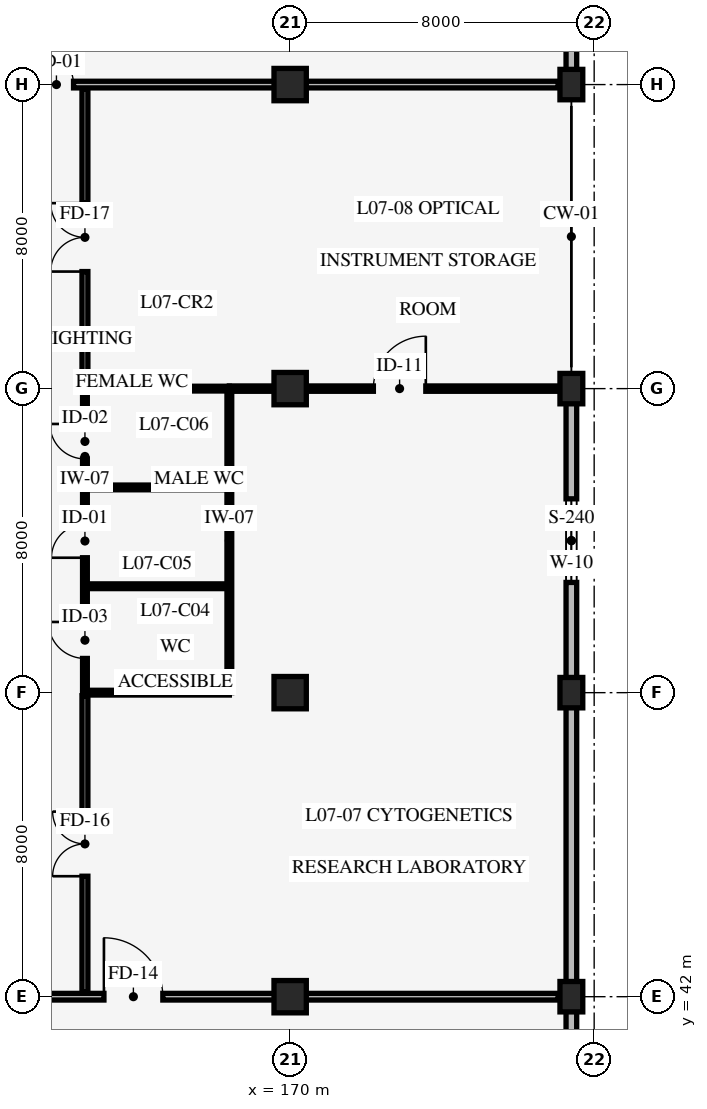
"""IFC4 building model, lengths in metres.
Left out: names, types, materials, properties, quantities, classifications, styles, units other than length and angle.
Written with IfcOpenShell. Run it as: python <this file> out.ifc"""

import sys

from ifc_helpers import new_model, si_unit, direction, frame, frame_2d, origin, origin_2d, place, context, subcontext, project, spatial, rectangle, extrude, element, fill, save


model = new_model("IFC4")
c1 = context("Model", 3, precision=1e-05, world=origin(), true_north=direction((0.0, 1.0)))
c2 = subcontext(c1, "Body", "Model", "MODEL_VIEW")
j1 = project(units=[si_unit("LENGTHUNIT", "METRE"), si_unit("PLANEANGLEUNIT", "RADIAN")], contexts=[c1])
p1 = place(None, origin())
s1 = spatial("IfcSite", under=j1, at=p1, CompositionType="ELEMENT")
p2 = place(p1, origin())
s2 = spatial("IfcBuilding", under=s1, at=p2, CompositionType="ELEMENT")
p3 = place(p2, frame((0.0, 0.0, 27.6)))
s3 = spatial("IfcBuildingStorey", under=s2, at=p3, CompositionType="ELEMENT", Elevation=27.6)
for number, where, z_axis, x_axis in (
    (1, (170.0, 42.0, 0.0), (0.0, 0.0, 1.0), (1.0, 0.0, 0.0)),
    (2, (170.0, 50.0, 0.0), (0.0, 0.0, 1.0), (1.0, 0.0, 0.0)),
    (3, (170.0, 58.0, 0.0), (0.0, 0.0, 1.0), (1.0, 0.0, 0.0)),
    (4, (170.0, 66.0, 0.0), (0.0, 0.0, 1.0), (1.0, 0.0, 0.0)),
):
    element("IfcColumn", number, at=place(p3, frame(where, z_axis=z_axis, x_axis=x_axis)), inside=s3, PredefinedType="COLUMN", context=c2, shape_type="SweptSolid", body=[
        extrude(rectangle(XDim=0.85, YDim=0.85, at=origin_2d()), origin(), (0.0, 0.0, 1.0), 4.2),
    ])
for number, where, z_axis, x_axis in (
    (5, (177.4, 42.0, 0.0), (0.0, 0.0, 1.0), (1.0, 0.0, 0.0)),
    (6, (177.4, 50.0, 0.0), (0.0, 0.0, 1.0), (1.0, 0.0, 0.0)),
    (7, (177.4, 58.0, 0.0), (0.0, 0.0, 1.0), (1.0, 0.0, 0.0)),
    (8, (177.4, 66.0, 0.0), (0.0, 0.0, 1.0), (1.0, 0.0, 0.0)),
):
    element("IfcColumn", number, at=place(p3, frame(where, z_axis=z_axis, x_axis=x_axis)), inside=s3, PredefinedType="COLUMN", context=c2, shape_type="SweptSolid", body=[
        extrude(rectangle(XDim=0.6, YDim=0.8, at=origin_2d()), origin(), (0.0, 0.0, 1.0), 4.2),
    ])
p4 = place(p3, frame((177.4, 74.0, 0.0), z_axis=(0.0, 0.0, 1.0), x_axis=(0.0, -1.0, 0.0)))
e9 = element("IfcWall", 9, at=p4, inside=s3, PredefinedType="STANDARD", context=c2, shape_type="SweptSolid", body=[
    extrude(rectangle(XDim=8.0, YDim=0.28, at=frame_2d((4.0, 0.0))), origin(), (0.0, 0.0, 1.0), 3.29),
])
p5 = place(p4, frame((2.7, 0.0, 0.85)))
e10 = element("IfcOpeningElement", 10, at=p5, cuts=e9, PredefinedType="OPENING", context=c2, shape_type="SweptSolid", body=[
    extrude(rectangle(XDim=2.6, YDim=1.5, at=frame_2d((1.3, 0.75))), frame((0.0, 0.15, 0.0), z_axis=(0.0, -1.0, 0.0), x_axis=(1.0, 0.0, 0.0)), (0.0, 0.0, 1.0), 0.3),
])
p6 = place(p3, frame((177.4, 58.0, 0.0), z_axis=(0.0, 0.0, 1.0), x_axis=(0.0, -1.0, 0.0)))
e11 = element("IfcWall", 11, at=p6, inside=s3, PredefinedType="STANDARD", context=c2, shape_type="SweptSolid", body=[
    extrude(rectangle(XDim=8.0, YDim=0.28, at=frame_2d((4.0, 0.0))), origin(), (0.0, 0.0, 1.0), 3.29),
])
p7 = place(p6, frame((2.9, 0.0, 0.85)))
e12 = element("IfcOpeningElement", 12, at=p7, cuts=e11, PredefinedType="OPENING", context=c2, shape_type="SweptSolid", body=[
    extrude(rectangle(XDim=2.2, YDim=1.4, at=frame_2d((1.1, 0.7))), frame((0.0, 0.15, 0.0), z_axis=(0.0, -1.0, 0.0), x_axis=(1.0, 0.0, 0.0)), (0.0, 0.0, 1.0), 0.3),
])
p8 = place(p3, frame((177.4, 50.0, 0.0), z_axis=(0.0, 0.0, 1.0), x_axis=(0.0, -1.0, 0.0)))
e13 = element("IfcWall", 13, at=p8, inside=s3, PredefinedType="STANDARD", context=c2, shape_type="SweptSolid", body=[
    extrude(rectangle(XDim=8.0, YDim=0.28, at=frame_2d((4.0, 0.0))), origin(), (0.0, 0.0, 1.0), 3.29),
])
p9 = place(p3, frame((177.4, 42.0, 0.0), z_axis=(0.0, 0.0, 1.0), x_axis=(0.0, -1.0, 0.0)))
e14 = element("IfcWall", 14, at=p9, inside=s3, PredefinedType="STANDARD", context=c2, shape_type="SweptSolid", body=[
    extrude(rectangle(XDim=8.0, YDim=0.28, at=frame_2d((4.0, 0.0))), origin(), (0.0, 0.0, 1.0), 3.29),
])
p10 = place(p9, frame((3.0, 0.0, 0.85)))
e15 = element("IfcOpeningElement", 15, at=p10, cuts=e14, PredefinedType="OPENING", context=c2, shape_type="SweptSolid", body=[
    extrude(rectangle(XDim=2.0, YDim=1.5, at=frame_2d((1.0, 0.75))), frame((0.0, 0.15, 0.0), z_axis=(0.0, -1.0, 0.0), x_axis=(1.0, 0.0, 0.0)), (0.0, 0.0, 1.0), 0.3),
])
p11 = place(p3, frame((164.6, 50.0, 0.0), z_axis=(0.0, 0.0, 1.0), x_axis=(0.0, 1.0, 0.0)))
e16 = element("IfcWall", 16, at=p11, inside=s3, PredefinedType="STANDARD", context=c2, shape_type="SweptSolid", body=[
    extrude(rectangle(XDim=8.0, YDim=0.125, at=frame_2d((4.0, 0.0))), origin(), (0.0, 0.0, 1.0), 3.9),
])
p12 = place(p11, frame((0.9, 0.0, 0.0)))
e17 = element("IfcOpeningElement", 17, at=p12, cuts=e16, PredefinedType="OPENING", context=c2, shape_type="SweptSolid", body=[
    extrude(rectangle(XDim=0.96, YDim=2.08, at=frame_2d((0.48, 1.04))), frame((0.0, 0.073, 0.0), z_axis=(0.0, -1.0, 0.0), x_axis=(1.0, 0.0, 0.0)), (0.0, 0.0, 1.0), 0.145),
])
p13 = place(p11, frame((3.55, 0.0, 0.0)))
e18 = element("IfcOpeningElement", 18, at=p13, cuts=e16, PredefinedType="OPENING", context=c2, shape_type="SweptSolid", body=[
    extrude(rectangle(XDim=0.88, YDim=2.05, at=frame_2d((0.44, 1.025))), frame((0.0, 0.073, 0.0), z_axis=(0.0, -1.0, 0.0), x_axis=(1.0, 0.0, 0.0)), (0.0, 0.0, 1.0), 0.145),
])
p14 = place(p11, frame((6.15, 0.0, 0.0)))
e19 = element("IfcOpeningElement", 19, at=p14, cuts=e16, PredefinedType="OPENING", context=c2, shape_type="SweptSolid", body=[
    extrude(rectangle(XDim=0.92, YDim=2.05, at=frame_2d((0.46, 1.025))), frame((0.0, 0.073, 0.0), z_axis=(0.0, -1.0, 0.0), x_axis=(1.0, 0.0, 0.0)), (0.0, 0.0, 1.0), 0.145),
])
p15 = place(p3, frame((168.4, 50.0, 0.0), z_axis=(0.0, 0.0, 1.0), x_axis=(0.0, 1.0, 0.0)))
e20 = element("IfcWall", 20, at=p15, inside=s3, PredefinedType="STANDARD", context=c2, shape_type="SweptSolid", body=[
    extrude(rectangle(XDim=8.0, YDim=0.125, at=frame_2d((4.0, 0.0))), origin(), (0.0, 0.0, 1.0), 3.9),
])
p16 = place(p3, frame((164.6, 50.0, 0.0), z_axis=(0.0, 0.0, 1.0), x_axis=(1.0, 0.0, 0.0)))
e21 = element("IfcWall", 21, at=p16, inside=s3, PredefinedType="STANDARD", context=c2, shape_type="SweptSolid", body=[
    extrude(rectangle(XDim=3.8, YDim=0.125, at=frame_2d((1.9, 0.0))), origin(), (0.0, 0.0, 1.0), 3.24),
])
for number, where, z_axis, x_axis in (
    (22, (164.6, 52.8, 0.0), (0.0, 0.0, 1.0), (1.0, 0.0, 0.0)),
    (23, (164.6, 55.4, 0.0), (0.0, 0.0, 1.0), (1.0, 0.0, 0.0)),
):
    element("IfcWall", number, at=place(p3, frame(where, z_axis=z_axis, x_axis=x_axis)), inside=s3, PredefinedType="STANDARD", context=c2, shape_type="SweptSolid", body=[
        extrude(rectangle(XDim=3.8, YDim=0.125, at=frame_2d((1.9, 0.0))), origin(), (0.0, 0.0, 1.0), 3.9),
    ])
p17 = place(p3, frame((164.6, 58.0, 0.0), z_axis=(0.0, 0.0, 1.0), x_axis=(1.0, 0.0, 0.0)))
e24 = element("IfcWall", 24, at=p17, inside=s3, PredefinedType="STANDARD", context=c2, shape_type="SweptSolid", body=[
    extrude(rectangle(XDim=3.8, YDim=0.125, at=frame_2d((1.9, 0.0))), origin(), (0.0, 0.0, 1.0), 3.24),
])
p18 = place(p3, frame((164.6, 42.12, 0.0), z_axis=(0.0, 0.0, 1.0), x_axis=(0.0, 1.0, 0.0)))
e25 = element("IfcWall", 25, at=p18, inside=s3, PredefinedType="STANDARD", context=c2, shape_type="SweptSolid", body=[
    extrude(rectangle(XDim=7.8, YDim=0.155, at=frame_2d((3.9, 0.0))), origin(), (0.0, 0.0, 1.0), 3.9),
])
p19 = place(p18, frame((3.05, 0.0, 0.0)))
e26 = element("IfcOpeningElement", 26, at=p19, cuts=e25, PredefinedType="OPENING", context=c2, shape_type="SweptSolid", body=[
    extrude(rectangle(XDim=1.7, YDim=2.3, at=frame_2d((0.85, 1.15))), frame((0.0, 0.087, 0.0), z_axis=(0.0, -1.0, 0.0), x_axis=(1.0, 0.0, 0.0)), (0.0, 0.0, 1.0), 0.175),
])
p20 = place(p3, frame((168.4, 58.0, 0.0), z_axis=(0.0, 0.0, 1.0), x_axis=(1.0, 0.0, 0.0)))
e27 = element("IfcWall", 27, at=p20, inside=s3, PredefinedType="STANDARD", context=c2, shape_type="SweptSolid", body=[
    extrude(rectangle(XDim=8.96, YDim=0.14, at=frame_2d((4.48, 0.0))), origin(), (0.0, 0.0, 1.0), 3.24),
])
p21 = place(p20, frame((3.79, 0.0, 0.0)))
e28 = element("IfcOpeningElement", 28, at=p21, cuts=e27, PredefinedType="OPENING", context=c2, shape_type="SweptSolid", body=[
    extrude(rectangle(XDim=1.38, YDim=2.16, at=frame_2d((0.69, 1.08))), frame((0.0, 0.08, 0.0), z_axis=(0.0, -1.0, 0.0), x_axis=(1.0, 0.0, 0.0)), (0.0, 0.0, 1.0), 0.16),
])
p22 = place(p3, frame((164.6, 58.08, 0.0), z_axis=(0.0, 0.0, 1.0), x_axis=(0.0, 1.0, 0.0)))
e29 = element("IfcWall", 29, at=p22, inside=s3, PredefinedType="STANDARD", context=c2, shape_type="SweptSolid", body=[
    extrude(rectangle(XDim=7.8, YDim=0.155, at=frame_2d((3.9, 0.0))), origin(), (0.0, 0.0, 1.0), 3.9),
])
p23 = place(p22, frame((3.0, 0.0, 0.0)))
e30 = element("IfcOpeningElement", 30, at=p23, cuts=e29, PredefinedType="OPENING", context=c2, shape_type="SweptSolid", body=[
    extrude(rectangle(XDim=1.8, YDim=2.3, at=frame_2d((0.9, 1.15))), frame((0.0, 0.087, 0.0), z_axis=(0.0, -1.0, 0.0), x_axis=(1.0, 0.0, 0.0)), (0.0, 0.0, 1.0), 0.175),
])
p24 = place(p3, frame((162.35, 42.0, 0.0), z_axis=(0.0, 0.0, 1.0), x_axis=(1.0, 0.0, 0.0)))
e31 = element("IfcWall", 31, at=p24, inside=s3, PredefinedType="STANDARD", context=c2, shape_type="SweptSolid", body=[
    extrude(rectangle(XDim=14.7, YDim=0.175, at=frame_2d((7.35, 0.0))), origin(), (0.0, 0.0, 1.0), 3.24),
])
p25 = place(p24, frame((2.75, 0.0, 0.0)))
e32 = element("IfcOpeningElement", 32, at=p25, cuts=e31, PredefinedType="OPENING", context=c2, shape_type="SweptSolid", body=[
    extrude(rectangle(XDim=1.55, YDim=2.25, at=frame_2d((0.775, 1.125))), frame((0.0, 0.098, 0.0), z_axis=(0.0, -1.0, 0.0), x_axis=(1.0, 0.0, 0.0)), (0.0, 0.0, 1.0), 0.195),
])
p26 = place(p3, frame((162.35, 66.0, 0.0), z_axis=(0.0, 0.0, 1.0), x_axis=(1.0, 0.0, 0.0)))
e33 = element("IfcWall", 33, at=p26, inside=s3, PredefinedType="STANDARD", context=c2, shape_type="SweptSolid", body=[
    extrude(rectangle(XDim=14.7, YDim=0.175, at=frame_2d((7.35, 0.0))), origin(), (0.0, 0.0, 1.0), 3.24),
])
p27 = place(p26, frame((1.05, 0.0, 0.0)))
e34 = element("IfcOpeningElement", 34, at=p27, cuts=e33, PredefinedType="OPENING", context=c2, shape_type="SweptSolid", body=[
    extrude(rectangle(XDim=0.9, YDim=2.1, at=frame_2d((0.45, 1.05))), frame((0.0, 0.098, 0.0), z_axis=(0.0, -1.0, 0.0), x_axis=(1.0, 0.0, 0.0)), (0.0, 0.0, 1.0), 0.195),
])
p28 = place(p7, origin())
e35 = element("IfcWindow", 35, at=p28, inside=s3, PartitioningType="SINGLE_PANEL", PredefinedType="WINDOW", context=c2, shape_type="SweptSolid", body=[
    extrude(rectangle(XDim=2.2, YDim=1.4, at=frame_2d((1.1, 0.7))), frame((0.0, 0.03, 0.0), z_axis=(0.0, -1.0, 0.0), x_axis=(1.0, 0.0, 0.0)), (0.0, 0.0, 1.0), 0.06),
])
fill(e12, e35)
p29 = place(p12, origin())
e36 = element("IfcDoor", 36, at=p29, inside=s3, OperationType="SINGLE_SWING_RIGHT", PredefinedType="DOOR", context=c2, shape_type="SweptSolid", body=[
    extrude(rectangle(XDim=0.96, YDim=2.08, at=frame_2d((0.48, 1.04))), frame((0.0, 0.025, 0.0), z_axis=(0.0, -1.0, 0.0), x_axis=(1.0, 0.0, 0.0)), (0.0, 0.0, 1.0), 0.05),
])
fill(e17, e36)
p30 = place(p13, origin())
e37 = element("IfcDoor", 37, at=p30, inside=s3, OperationType="SINGLE_SWING_LEFT", PredefinedType="DOOR", context=c2, shape_type="SweptSolid", body=[
    extrude(rectangle(XDim=0.88, YDim=2.05, at=frame_2d((0.44, 1.025))), frame((0.0, 0.025, 0.0), z_axis=(0.0, -1.0, 0.0), x_axis=(1.0, 0.0, 0.0)), (0.0, 0.0, 1.0), 0.05),
])
fill(e18, e37)
p31 = place(p14, origin())
e38 = element("IfcDoor", 38, at=p31, inside=s3, OperationType="SINGLE_SWING_RIGHT", PredefinedType="DOOR", context=c2, shape_type="SweptSolid", body=[
    extrude(rectangle(XDim=0.92, YDim=2.05, at=frame_2d((0.46, 1.025))), frame((0.0, 0.025, 0.0), z_axis=(0.0, -1.0, 0.0), x_axis=(1.0, 0.0, 0.0)), (0.0, 0.0, 1.0), 0.05),
])
fill(e19, e38)
p32 = place(p19, origin())
e39 = element("IfcDoor", 39, at=p32, inside=s3, OperationType="DOUBLE_DOOR_SINGLE_SWING", PredefinedType="DOOR", context=c2, shape_type="SweptSolid", body=[
    extrude(rectangle(XDim=1.7, YDim=2.3, at=frame_2d((0.85, 1.15))), frame((0.0, 0.025, 0.0), z_axis=(0.0, -1.0, 0.0), x_axis=(1.0, 0.0, 0.0)), (0.0, 0.0, 1.0), 0.05),
])
fill(e26, e39)
p33 = place(p21, origin())
e40 = element("IfcDoor", 40, at=p33, inside=s3, OperationType="SINGLE_SWING_RIGHT", PredefinedType="DOOR", context=c2, shape_type="SweptSolid", body=[
    extrude(rectangle(XDim=1.38, YDim=2.16, at=frame_2d((0.69, 1.08))), frame((0.0, 0.025, 0.0), z_axis=(0.0, -1.0, 0.0), x_axis=(1.0, 0.0, 0.0)), (0.0, 0.0, 1.0), 0.05),
])
fill(e28, e40)
p34 = place(p23, origin())
e41 = element("IfcDoor", 41, at=p34, inside=s3, OperationType="DOUBLE_DOOR_SINGLE_SWING", PredefinedType="DOOR", context=c2, shape_type="SweptSolid", body=[
    extrude(rectangle(XDim=1.8, YDim=2.3, at=frame_2d((0.9, 1.15))), frame((0.0, 0.025, 0.0), z_axis=(0.0, -1.0, 0.0), x_axis=(1.0, 0.0, 0.0)), (0.0, 0.0, 1.0), 0.05),
])
fill(e30, e41)
p35 = place(p25, origin())
e42 = element("IfcDoor", 42, at=p35, inside=s3, OperationType="SINGLE_SWING_LEFT", PredefinedType="DOOR", context=c2, shape_type="SweptSolid", body=[
    extrude(rectangle(XDim=1.55, YDim=2.25, at=frame_2d((0.775, 1.125))), frame((0.0, 0.025, 0.0), z_axis=(0.0, -1.0, 0.0), x_axis=(1.0, 0.0, 0.0)), (0.0, 0.0, 1.0), 0.05),
])
fill(e32, e42)
p36 = place(p27, origin())
e43 = element("IfcDoor", 43, at=p36, inside=s3, OperationType="SINGLE_SWING_LEFT", PredefinedType="DOOR", context=c2, shape_type="SweptSolid", body=[
    extrude(rectangle(XDim=0.9, YDim=2.1, at=frame_2d((0.45, 1.05))), frame((0.0, 0.025, 0.0), z_axis=(0.0, -1.0, 0.0), x_axis=(1.0, 0.0, 0.0)), (0.0, 0.0, 1.0), 0.05),
])
fill(e34, e43)
save(model, sys.argv[1])
